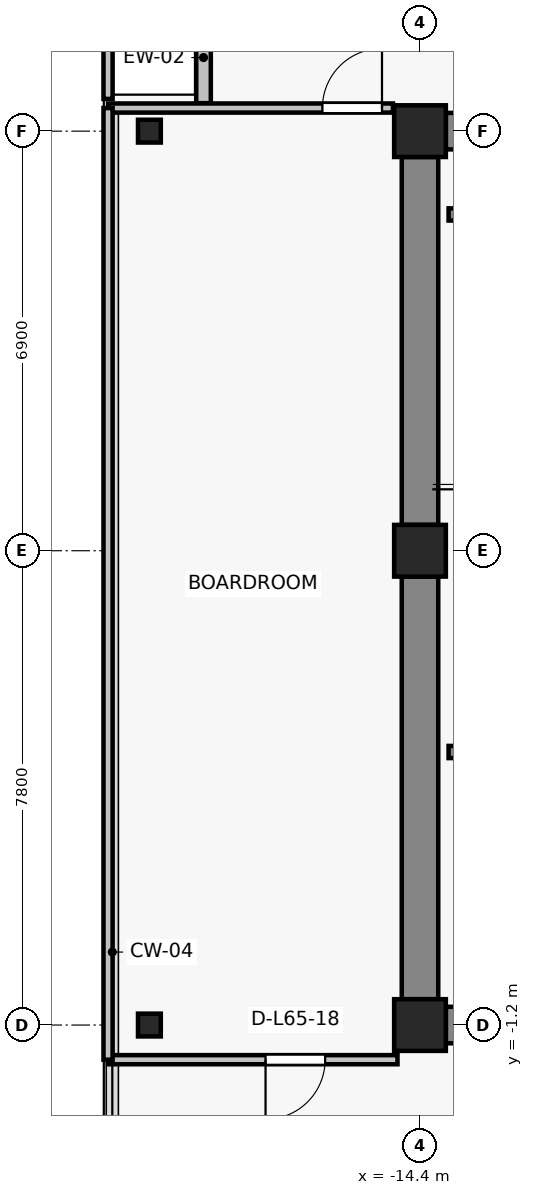
"""IFC4 building model, lengths in metres.
Left out: names, types, materials, properties, quantities, classifications, styles, units other than length and angle.
Written with IfcOpenShell. Run it as: python <this file> out.ifc"""

import sys

from ifc_helpers import new_model, si_unit, direction, frame, frame_2d, origin, origin_2d, place, context, subcontext, project, spatial, rectangle, i_section, extrude, source, transform, mapped, element, fill, save


model = new_model("IFC4")
c1 = context("Model", 3, precision=1e-05, world=origin(), true_north=direction((0.0, 1.0)))
c2 = subcontext(c1, "Body", "Model", "MODEL_VIEW")
j1 = project(units=[si_unit("LENGTHUNIT", "METRE"), si_unit("PLANEANGLEUNIT", "RADIAN")], contexts=[c1])
p1 = place(None, origin())
s1 = spatial("IfcSite", under=j1, at=p1, CompositionType="ELEMENT")
p2 = place(p1, origin())
s2 = spatial("IfcBuilding", under=s1, at=p2, CompositionType="ELEMENT")
p3 = place(p2, frame((0.0, 0.0, 232.0)))
s3 = spatial("IfcBuildingStorey", under=s2, at=p3, CompositionType="ELEMENT", Elevation=232.0)
for number, where, z_axis, x_axis in (
    (1, (-14.4, -1.2, 0.0), (0.0, 0.0, 1.0), (1.0, 0.0, 0.0)),
    (2, (-14.4, 6.6, 0.0), (0.0, 0.0, 1.0), (1.0, 0.0, 0.0)),
    (3, (-14.4, 13.5, 0.0), (0.0, 0.0, 1.0), (1.0, 0.0, 0.0)),
):
    element("IfcColumn", number, at=place(p3, frame(where, z_axis=z_axis, x_axis=x_axis)), inside=s3, PredefinedType="COLUMN", context=c2, shape_type="SweptSolid", body=[
        extrude(rectangle(XDim=0.85, YDim=0.85, at=origin_2d()), origin(), (0.0, 0.0, 1.0), 3.3),
    ])
for number, where, z_axis, x_axis in (
    (4, (-18.85, -1.2, 0.0), (0.0, 0.0, 1.0), (1.0, 0.0, 0.0)),
    (5, (-18.85, 13.5, 0.0), (0.0, 0.0, 1.0), (1.0, 0.0, 0.0)),
):
    element("IfcColumn", number, at=place(p3, frame(where, z_axis=z_axis, x_axis=x_axis)), inside=s3, PredefinedType="COLUMN", context=c2, shape_type="SweptSolid", body=[
        extrude(i_section(OverallWidth=0.375, OverallDepth=0.375, WebThickness=0.017, FlangeThickness=0.027, FilletRadius=0.015, at=origin_2d()), origin(), (0.0, 0.0, 1.0), 3.3),
    ])
p4 = place(p3, frame((-13.975, 13.5, 0.0), z_axis=(0.0, 0.0, 1.0), x_axis=(1.0, 0.0, 0.0)))
e6 = element("IfcWall", 6, at=p4, inside=s3, PredefinedType="SHEAR", context=c2, shape_type="SweptSolid", body=[
    extrude(rectangle(XDim=6.35, YDim=0.6, at=frame_2d((3.175, 0.0))), origin(), (0.0, 0.0, 1.0), 3.075),
])
p5 = place(p3, frame((-14.4, -0.775, 0.0), z_axis=(0.0, 0.0, 1.0), x_axis=(0.0, 1.0, 0.0)))
e7 = element("IfcWall", 7, at=p5, inside=s3, PredefinedType="SHEAR", context=c2, shape_type="SweptSolid", body=[
    extrude(rectangle(XDim=6.95, YDim=0.6, at=frame_2d((3.475, 0.0))), origin(), (0.0, 0.0, 1.0), 3.075),
])
p6 = place(p3, frame((-14.4, 7.025, 0.0), z_axis=(0.0, 0.0, 1.0), x_axis=(0.0, 1.0, 0.0)))
e8 = element("IfcWall", 8, at=p6, inside=s3, PredefinedType="SHEAR", context=c2, shape_type="SweptSolid", body=[
    extrude(rectangle(XDim=6.05, YDim=0.6, at=frame_2d((3.025, 0.0))), origin(), (0.0, 0.0, 1.0), 3.075),
])
p7 = place(p3, frame((-7.625, -1.2, 0.0), z_axis=(0.0, 0.0, 1.0), x_axis=(-1.0, 0.0, 0.0)))
e9 = element("IfcWall", 9, at=p7, inside=s3, PredefinedType="SHEAR", context=c2, shape_type="SweptSolid", body=[
    extrude(rectangle(XDim=6.35, YDim=0.6, at=frame_2d((3.175, 0.0))), origin(), (0.0, 0.0, 1.0), 3.075),
])
p8 = place(p7, frame((2.7, 0.0, 0.0)))
e10 = element("IfcOpeningElement", 10, at=p8, cuts=e9, PredefinedType="OPENING", context=c2, shape_type="SweptSolid", body=[
    extrude(rectangle(XDim=1.15, YDim=2.15, at=frame_2d((0.575, 1.075))), frame((0.0, 0.31, 0.0), z_axis=(0.0, -1.0, 0.0), x_axis=(1.0, 0.0, 0.0)), (0.0, 0.0, 1.0), 0.62),
])
p9 = place(p3, frame((-17.96, 15.46, 0.0), z_axis=(0.0, 0.0, 1.0), x_axis=(0.0, -1.0, 0.0)))
e11 = element("IfcWall", 11, at=p9, inside=s3, PredefinedType="SOLIDWALL", context=c2, shape_type="SweptSolid", body=[
    extrude(rectangle(XDim=1.5, YDim=0.24, at=frame_2d((0.75, 0.0))), origin(), (0.0, 0.0, 1.0), 3.075),
])
p10 = place(p3, frame((-10.41, 3.29, 0.0), z_axis=(0.0, 0.0, 1.0), x_axis=(-1.0, 0.0, 0.0)))
e12 = element("IfcWall", 12, at=p10, inside=s3, PredefinedType="SOLIDWALL", context=c2, shape_type="SweptSolid", body=[
    extrude(rectangle(XDim=3.52, YDim=0.2, at=frame_2d((1.76, 0.0))), origin(), (0.0, 0.0, 1.0), 3.075),
])
p11 = place(p10, frame((1.165, 0.0, 0.0)))
e13 = element("IfcOpeningElement", 13, at=p11, cuts=e12, PredefinedType="OPENING", context=c2, shape_type="SweptSolid", body=[
    extrude(rectangle(XDim=1.15, YDim=2.15, at=frame_2d((0.575, 1.075))), frame((0.0, 0.11, 0.0), z_axis=(0.0, -1.0, 0.0), x_axis=(1.0, 0.0, 0.0)), (0.0, 0.0, 1.0), 0.22),
])
p12 = place(p3, frame((-13.93, 12.13, 0.0), z_axis=(0.0, 0.0, 1.0), x_axis=(1.0, 0.0, 0.0)))
e14 = element("IfcWall", 14, at=p12, inside=s3, PredefinedType="SOLIDWALL", context=c2, shape_type="SweptSolid", body=[
    extrude(rectangle(XDim=3.52, YDim=0.2, at=frame_2d((1.76, 0.0))), origin(), (0.0, 0.0, 1.0), 3.075),
])
p13 = place(p3, frame((-14.77, -1.77, 0.0), z_axis=(0.0, 0.0, 1.0), x_axis=(-1.0, 0.0, 0.0)))
e15 = element("IfcWall", 15, at=p13, inside=s3, PredefinedType="PARTITIONING", context=c2, shape_type="SweptSolid", body=[
    extrude(rectangle(XDim=4.76, YDim=0.15, at=frame_2d((2.38, 0.0))), origin(), (0.0, 0.0, 1.0), 2.765),
])
p14 = place(p13, frame((1.19, 0.0, 0.0)))
e16 = element("IfcOpeningElement", 16, at=p14, cuts=e15, PredefinedType="OPENING", context=c2, shape_type="SweptSolid", body=[
    extrude(rectangle(XDim=0.98, YDim=2.15, at=frame_2d((0.49, 1.075))), frame((0.0, 0.085, 0.0), z_axis=(0.0, -1.0, 0.0), x_axis=(1.0, 0.0, 0.0)), (0.0, 0.0, 1.0), 0.17),
])
p15 = place(p3, frame((-19.53, 13.88, 0.0), z_axis=(0.0, 0.0, 1.0), x_axis=(1.0, 0.0, 0.0)))
e17 = element("IfcWall", 17, at=p15, inside=s3, PredefinedType="PARTITIONING", context=c2, shape_type="SweptSolid", body=[
    extrude(rectangle(XDim=4.685, YDim=0.15, at=frame_2d((2.343, 0.0))), origin(), (0.0, 0.0, 1.0), 3.075),
])
p16 = place(p15, frame((3.525, 0.0, 0.0)))
e18 = element("IfcOpeningElement", 18, at=p16, cuts=e17, PredefinedType="OPENING", context=c2, shape_type="SweptSolid", body=[
    extrude(rectangle(XDim=0.98, YDim=2.15, at=frame_2d((0.49, 1.075))), frame((0.0, 0.085, 0.0), z_axis=(0.0, -1.0, 0.0), x_axis=(1.0, 0.0, 0.0)), (0.0, 0.0, 1.0), 0.17),
])
p17 = place(p3, frame((-19.53, -1.77, 0.0), z_axis=(0.0, 0.0, 1.0), x_axis=(0.0, 1.0, 0.0)))
e19 = element("IfcWall", 19, at=p17, inside=s3, PredefinedType="PARTITIONING", context=c2, shape_type="SweptSolid", body=[
    extrude(rectangle(XDim=15.65, YDim=0.15, at=frame_2d((7.825, 0.0))), origin(), (0.0, 0.0, 1.0), 3.075),
])
p18 = place(p3, frame((-19.53, 14.03, 0.0), z_axis=(0.0, 0.0, 1.0), x_axis=(0.0, 1.0, 0.0)))
e20 = element("IfcWall", 20, at=p18, inside=s3, PredefinedType="PARTITIONING", context=c2, shape_type="SweptSolid", body=[
    extrude(rectangle(XDim=3.0, YDim=0.15, at=frame_2d((1.5, 0.0))), origin(), (0.0, 0.0, 1.0), 3.075),
])
m1 = source(origin(), c2, "Body", "SweptSolid", [
    extrude(rectangle(XDim=0.98, YDim=2.15, at=frame_2d((0.49, 1.075))), frame((0.0, 0.025, 0.0), z_axis=(0.0, -1.0, 0.0), x_axis=(1.0, 0.0, 0.0)), (0.0, 0.0, 1.0), 0.05),
])
p19 = place(p14, origin())
e21 = element("IfcDoor", 21, at=p19, inside=s3, OperationType="SINGLE_SWING_RIGHT", PredefinedType="DOOR", context=c2, shape_type="MappedRepresentation", body=[
    mapped(m1, transform((0.0, 0.0, 0.0), x_axis=(1.0, 0.0, 0.0), y_axis=(0.0, 1.0, 0.0), z_axis=(0.0, 0.0, 1.0), scale=1.0)),
])
fill(e16, e21)
p20 = place(p16, origin())
e22 = element("IfcDoor", 22, at=p20, inside=s3, OperationType="SINGLE_SWING_RIGHT", PredefinedType="DOOR", context=c2, shape_type="MappedRepresentation", body=[
    mapped(m1, transform((0.0, 0.0, 0.0), x_axis=(1.0, 0.0, 0.0), y_axis=(0.0, 1.0, 0.0), z_axis=(0.0, 0.0, 1.0), scale=1.0)),
])
fill(e18, e22)
save(model, sys.argv[1])
